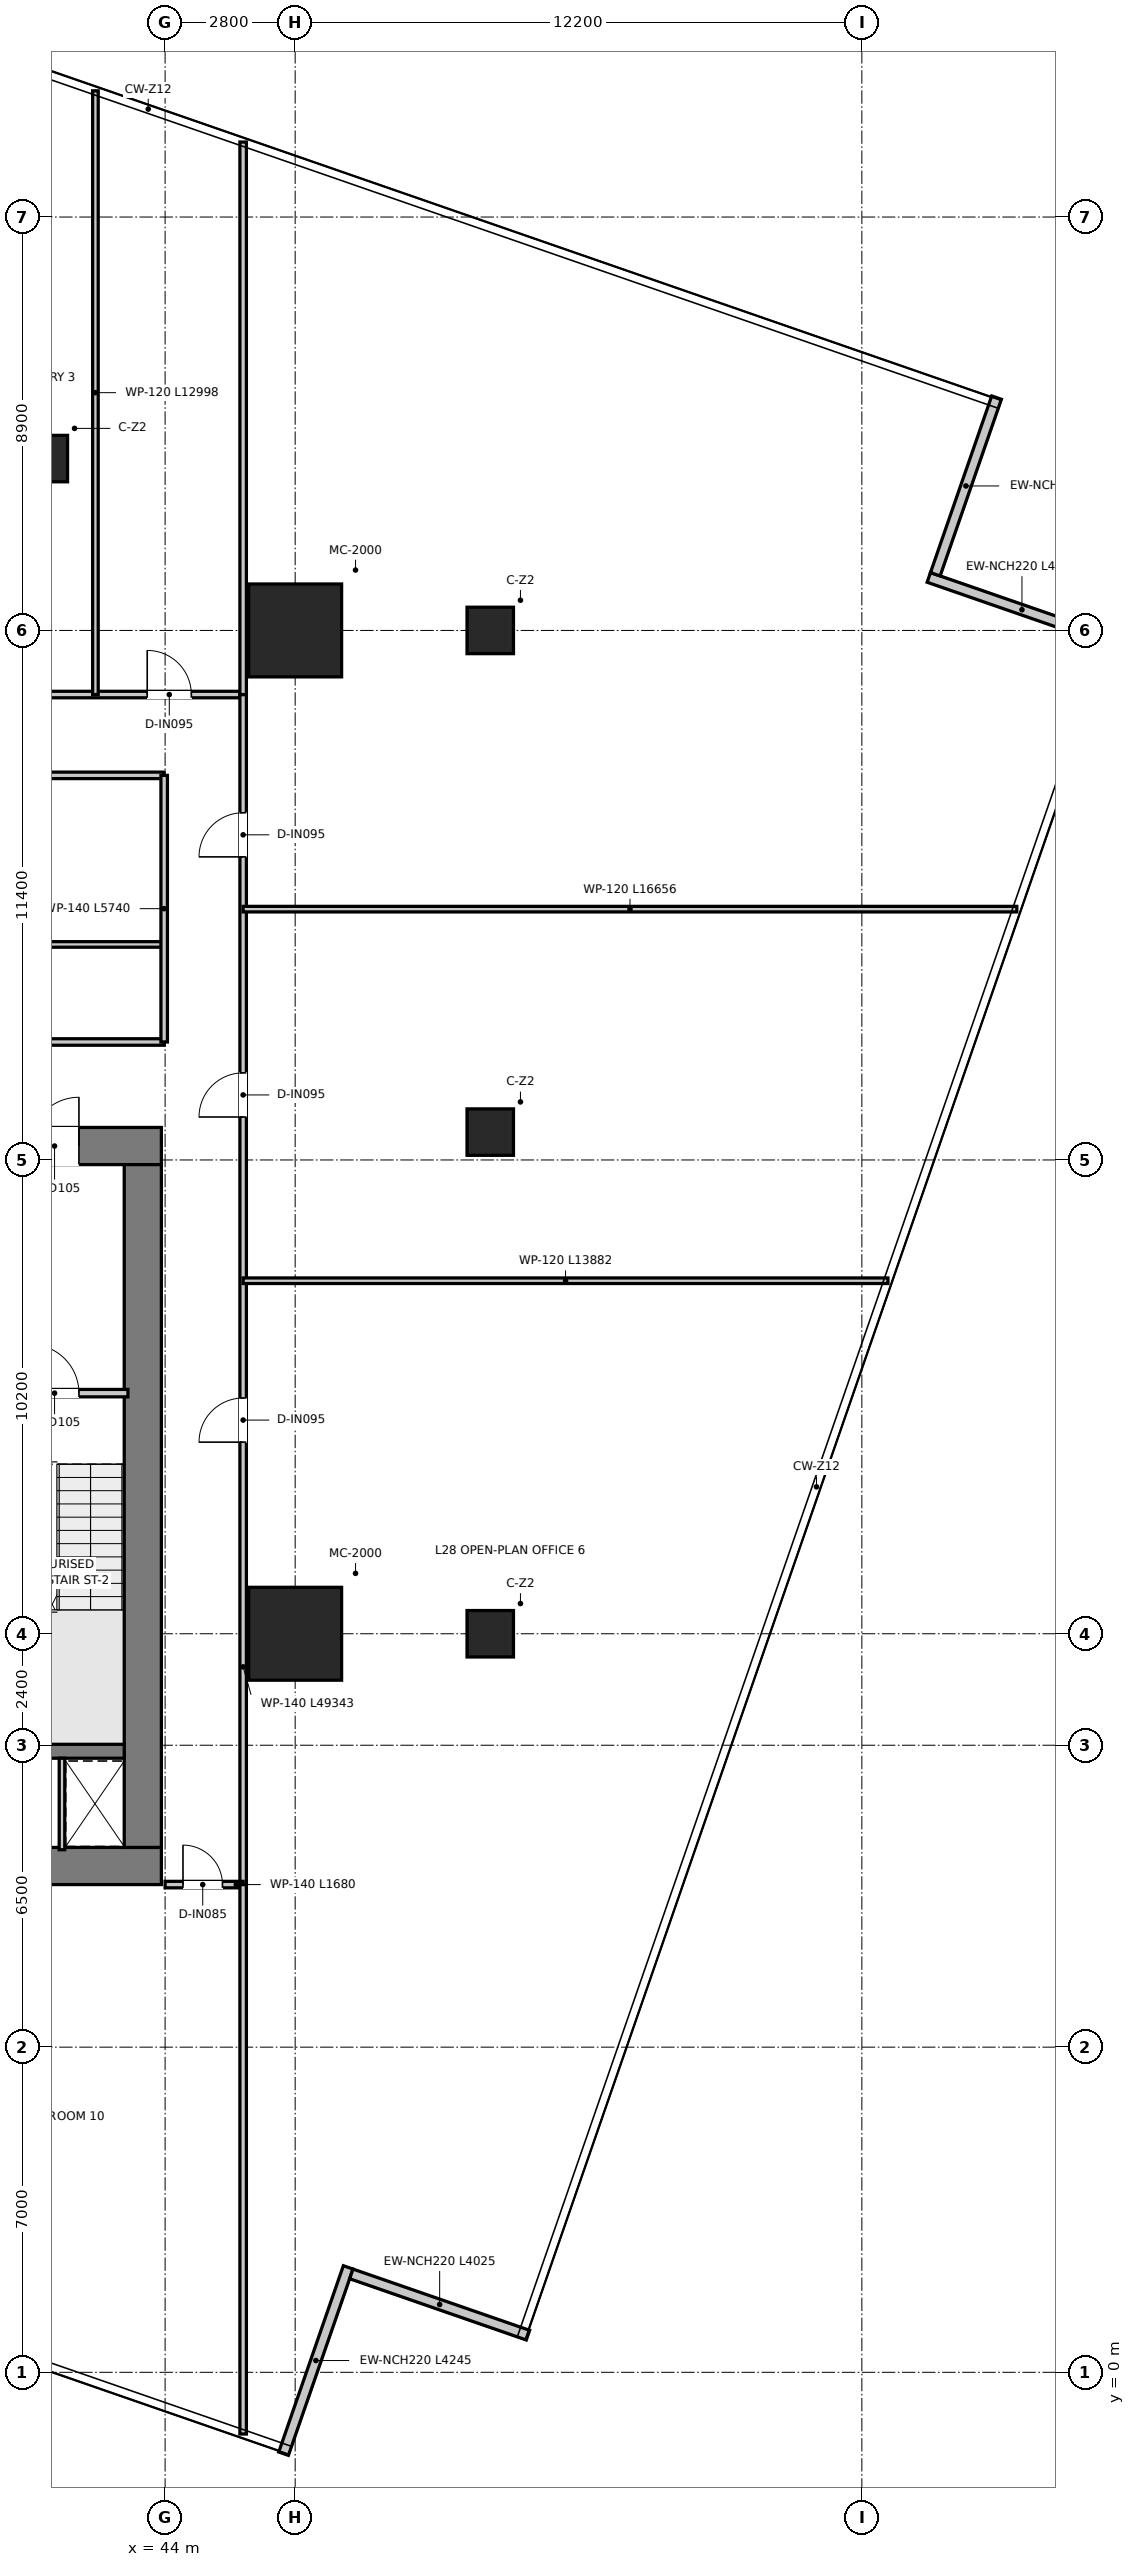
"""IFC4 building model, lengths in metres.
Left out: names, types, materials, properties, quantities, classifications, styles, units other than length and angle.
Written with IfcOpenShell. Run it as: python <this file> out.ifc"""

import sys

from ifc_helpers import new_model, si_unit, direction, frame, frame_2d, origin, origin_2d, place, context, subcontext, project, spatial, rectangle, extrude, source, transform, mapped, element, fill, save


model = new_model("IFC4")
c1 = context("Model", 3, precision=1e-05, world=origin(), true_north=direction((0.0, 1.0)))
c2 = subcontext(c1, "Body", "Model", "MODEL_VIEW")
j1 = project(units=[si_unit("LENGTHUNIT", "METRE"), si_unit("PLANEANGLEUNIT", "RADIAN")], contexts=[c1])
p1 = place(None, origin())
s1 = spatial("IfcSite", under=j1, at=p1, CompositionType="ELEMENT")
p2 = place(p1, origin())
s2 = spatial("IfcBuilding", under=s1, at=p2, CompositionType="ELEMENT")
p3 = place(p2, frame((0.0, 0.0, 117.7)))
s3 = spatial("IfcBuildingStorey", under=s2, at=p3, CompositionType="ELEMENT", Elevation=117.7)
p4 = place(p3, frame((28.08, 10.9, 0.0), z_axis=(0.0, 0.0, 1.0), x_axis=(1.0, 0.0, 0.0)))
e1 = element("IfcWall", 1, at=p4, inside=s3, PredefinedType="SHEAR", context=c2, shape_type="SweptSolid", body=[
    extrude(rectangle(XDim=15.84, YDim=0.8, at=frame_2d((7.92, 0.0))), origin(), (0.0, 0.0, 1.0), 3.95),
])
p5 = place(p3, frame((28.08, 26.4, 0.0), z_axis=(0.0, 0.0, 1.0), x_axis=(1.0, 0.0, 0.0)))
e2 = element("IfcWall", 2, at=p5, inside=s3, PredefinedType="SHEAR", context=c2, shape_type="SweptSolid", body=[
    extrude(rectangle(XDim=15.84, YDim=0.8, at=frame_2d((7.92, 0.0))), origin(), (0.0, 0.0, 1.0), 3.95),
])
p6 = place(p5, frame((7.22, 0.0, 0.0)))
e3 = element("IfcOpeningElement", 3, at=p6, cuts=e2, PredefinedType="OPENING", context=c2, shape_type="SweptSolid", body=[
    extrude(rectangle(XDim=1.4, YDim=2.2, at=frame_2d((0.7, 1.1))), frame((0.0, 0.41, 0.0), z_axis=(0.0, -1.0, 0.0), x_axis=(1.0, 0.0, 0.0)), (0.0, 0.0, 1.0), 0.82),
])
p7 = place(p5, frame((1.775, 0.0, 0.0)))
e4 = element("IfcOpeningElement", 4, at=p7, cuts=e2, PredefinedType="OPENING", context=c2, shape_type="SweptSolid", body=[
    extrude(rectangle(XDim=1.05, YDim=2.1, at=frame_2d((0.525, 1.05))), frame((0.0, 0.41, 0.0), z_axis=(0.0, -1.0, 0.0), x_axis=(1.0, 0.0, 0.0)), (0.0, 0.0, 1.0), 0.82),
])
p8 = place(p5, frame((13.015, 0.0, 0.0)))
e5 = element("IfcOpeningElement", 5, at=p8, cuts=e2, PredefinedType="OPENING", context=c2, shape_type="SweptSolid", body=[
    extrude(rectangle(XDim=1.05, YDim=2.1, at=frame_2d((0.525, 1.05))), frame((0.0, 0.41, 0.0), z_axis=(0.0, -1.0, 0.0), x_axis=(1.0, 0.0, 0.0)), (0.0, 0.0, 1.0), 0.82),
])
p9 = place(p3, frame((43.52, 11.3, 0.0), z_axis=(0.0, 0.0, 1.0), x_axis=(0.0, 1.0, 0.0)))
e6 = element("IfcWall", 6, at=p9, inside=s3, PredefinedType="SHEAR", context=c2, shape_type="SweptSolid", body=[
    extrude(rectangle(XDim=14.7, YDim=0.8, at=frame_2d((7.35, 0.0))), origin(), (0.0, 0.0, 1.0), 3.95),
])
p10 = place(p3, frame((40.02, 13.37, 0.0), z_axis=(0.0, 0.0, 1.0), x_axis=(1.0, 0.0, 0.0)))
e7 = element("IfcWall", 7, at=p10, inside=s3, PredefinedType="SHEAR", context=c2, shape_type="SweptSolid", body=[
    extrude(rectangle(XDim=3.1, YDim=0.3, at=frame_2d((1.55, 0.0))), origin(), (0.0, 0.0, 1.0), 3.95),
])
m1 = source(origin(), c2, "Body", "SweptSolid", [
    extrude(rectangle(XDim=2.0, YDim=2.0, at=origin_2d()), origin(), (0.0, 0.0, 1.0), 3.95),
])
for number, where, z_axis, x_axis in (
    (8, (46.8, 15.9, 0.0), (0.0, 0.0, 1.0), (1.0, 0.0, 0.0)),
    (9, (46.8, 37.5, 0.0), (0.0, 0.0, 1.0), (1.0, 0.0, 0.0)),
):
    element("IfcColumn", number, at=place(p3, frame(where, z_axis=z_axis, x_axis=x_axis)), inside=s3, PredefinedType="USERDEFINED", context=c2, shape_type="MappedRepresentation", body=[
        mapped(m1, transform((0.0, 0.0, 0.0), x_axis=(1.0, 0.0, 0.0), y_axis=(0.0, 1.0, 0.0), z_axis=(0.0, 0.0, 1.0), scale=1.0)),
    ])
m2 = source(origin(), c2, "Body", "SweptSolid", [
    extrude(rectangle(XDim=1.0, YDim=1.0, at=origin_2d()), origin(), (0.0, 0.0, 1.0), 3.95),
])
for number, where, z_axis, x_axis in (
    (10, (41.4, 41.2, 0.0), (0.0, 0.0, 1.0), (1.0, 0.0, 0.0)),
    (11, (51.0, 37.5, 0.0), (0.0, 0.0, 1.0), (1.0, 0.0, 0.0)),
    (12, (51.0, 26.7, 0.0), (0.0, 0.0, 1.0), (1.0, 0.0, 0.0)),
    (13, (51.0, 15.9, 0.0), (0.0, 0.0, 1.0), (1.0, 0.0, 0.0)),
):
    element("IfcColumn", number, at=place(p3, frame(where, z_axis=z_axis, x_axis=x_axis)), inside=s3, PredefinedType="COLUMN", context=c2, shape_type="MappedRepresentation", body=[
        mapped(m2, transform((0.0, 0.0, 0.0), x_axis=(1.0, 0.0, 0.0), y_axis=(0.0, 1.0, 0.0), z_axis=(0.0, 0.0, 1.0), scale=1.0)),
    ])
p11 = place(p3, frame((46.551, -1.752, 0.0), z_axis=(0.0, 0.0, 1.0), x_axis=(0.327661647146, 0.944795133873, 0.0)))
e14 = element("IfcWall", 14, at=p11, inside=s3, PredefinedType="ELEMENTEDWALL", context=c2, shape_type="SweptSolid", body=[
    extrude(rectangle(XDim=4.245, YDim=0.22, at=frame_2d((2.123, 0.0))), origin(), (0.0, 0.0, 1.0), 3.67),
])
p12 = place(p3, frame((48.009, 2.119, 0.0), z_axis=(0.0, 0.0, 1.0), x_axis=(0.944811416539, -0.327614693164, 0.0)))
e15 = element("IfcWall", 15, at=p12, inside=s3, PredefinedType="ELEMENTEDWALL", context=c2, shape_type="SweptSolid", body=[
    extrude(rectangle(XDim=4.025, YDim=0.22, at=frame_2d((2.012, 0.0))), origin(), (0.0, 0.0, 1.0), 3.67),
])
p13 = place(p3, frame((64.452, 37.25, 0.0), z_axis=(0.0, 0.0, 1.0), x_axis=(-0.944801308279, 0.327643843028, 0.0)))
e16 = element("IfcWall", 16, at=p13, inside=s3, PredefinedType="ELEMENTEDWALL", context=c2, shape_type="SweptSolid", body=[
    extrude(rectangle(XDim=4.245, YDim=0.22, at=frame_2d((2.123, 0.0))), origin(), (0.0, 0.0, 1.0), 3.67),
])
p14 = place(p3, frame((60.581, 38.709, 0.0), z_axis=(0.0, 0.0, 1.0), x_axis=(0.327650062068, 0.94479915158, 0.0)))
e17 = element("IfcWall", 17, at=p14, inside=s3, PredefinedType="ELEMENTEDWALL", context=c2, shape_type="SweptSolid", body=[
    extrude(rectangle(XDim=4.025, YDim=0.22, at=frame_2d((2.013, 0.0))), origin(), (0.0, 0.0, 1.0), 3.67),
])
p15 = place(p3, frame((40.04, 21.08, 0.0), z_axis=(0.0, 0.0, 1.0), x_axis=(1.0, 0.0, 0.0)))
e18 = element("IfcWall", 18, at=p15, inside=s3, PredefinedType="PARTITIONING", context=c2, shape_type="SweptSolid", body=[
    extrude(rectangle(XDim=3.16, YDim=0.16, at=frame_2d((1.58, 0.0))), origin(), (0.0, 0.0, 1.0), 3.67),
])
p16 = place(p15, frame((1.055, 0.0, 0.0)))
e19 = element("IfcOpeningElement", 19, at=p16, cuts=e18, PredefinedType="OPENING", context=c2, shape_type="SweptSolid", body=[
    extrude(rectangle(XDim=1.05, YDim=2.1, at=frame_2d((0.525, 1.05))), frame((0.0, 0.09, 0.0), z_axis=(0.0, -1.0, 0.0), x_axis=(1.0, 0.0, 0.0)), (0.0, 0.0, 1.0), 0.18),
])
p17 = place(p3, frame((41.78, 11.25, 0.0), z_axis=(0.0, 0.0, 1.0), x_axis=(0.0, 1.0, 0.0)))
e20 = element("IfcWall", 20, at=p17, inside=s3, PredefinedType="PARTITIONING", context=c2, shape_type="SweptSolid", body=[
    extrude(rectangle(XDim=1.97, YDim=0.12, at=frame_2d((0.985, 0.0))), origin(), (0.0, 0.0, 1.0), 3.67),
])
p18 = place(p3, frame((28.02, 28.64, 0.0), z_axis=(0.0, 0.0, 1.0), x_axis=(1.0, 0.0, 0.0)))
e21 = element("IfcWall", 21, at=p18, inside=s3, PredefinedType="PARTITIONING", context=c2, shape_type="SweptSolid", body=[
    extrude(rectangle(XDim=15.96, YDim=0.14, at=frame_2d((7.98, 0.0))), origin(), (0.0, 0.0, 1.0), 3.08),
])
p19 = place(p18, frame((7.455, 0.0, 0.0)))
e22 = element("IfcOpeningElement", 22, at=p19, cuts=e21, PredefinedType="OPENING", context=c2, shape_type="SweptSolid", body=[
    extrude(rectangle(XDim=1.05, YDim=2.15, at=frame_2d((0.525, 1.075))), frame((0.0, 0.08, 0.0), z_axis=(0.0, -1.0, 0.0), x_axis=(1.0, 0.0, 0.0)), (0.0, 0.0, 1.0), 0.16),
])
p20 = place(p3, frame((28.02, 30.74, 0.0), z_axis=(0.0, 0.0, 1.0), x_axis=(1.0, 0.0, 0.0)))
e23 = element("IfcWall", 23, at=p20, inside=s3, PredefinedType="PARTITIONING", context=c2, shape_type="SweptSolid", body=[
    extrude(rectangle(XDim=15.96, YDim=0.12, at=frame_2d((7.98, 0.0))), origin(), (0.0, 0.0, 1.0), 3.08),
])
p21 = place(p3, frame((28.02, 34.38, 0.0), z_axis=(0.0, 0.0, 1.0), x_axis=(1.0, 0.0, 0.0)))
e24 = element("IfcWall", 24, at=p21, inside=s3, PredefinedType="PARTITIONING", context=c2, shape_type="SweptSolid", body=[
    extrude(rectangle(XDim=15.96, YDim=0.14, at=frame_2d((7.98, 0.0))), origin(), (0.0, 0.0, 1.0), 3.08),
])
p22 = place(p21, frame((1.13, 0.0, 0.0)))
e25 = element("IfcOpeningElement", 25, at=p22, cuts=e24, PredefinedType="OPENING", context=c2, shape_type="SweptSolid", body=[
    extrude(rectangle(XDim=0.9, YDim=2.1, at=frame_2d((0.45, 1.05))), frame((0.0, 0.08, 0.0), z_axis=(0.0, -1.0, 0.0), x_axis=(1.0, 0.0, 0.0)), (0.0, 0.0, 1.0), 0.16),
])
p23 = place(p21, frame((4.33, 0.0, 0.0)))
e26 = element("IfcOpeningElement", 26, at=p23, cuts=e24, PredefinedType="OPENING", context=c2, shape_type="SweptSolid", body=[
    extrude(rectangle(XDim=0.9, YDim=2.1, at=frame_2d((0.45, 1.05))), frame((0.0, 0.08, 0.0), z_axis=(0.0, -1.0, 0.0), x_axis=(1.0, 0.0, 0.0)), (0.0, 0.0, 1.0), 0.16),
])
p24 = place(p21, frame((7.355, 0.0, 0.0)))
e27 = element("IfcOpeningElement", 27, at=p24, cuts=e24, PredefinedType="OPENING", context=c2, shape_type="SweptSolid", body=[
    extrude(rectangle(XDim=0.95, YDim=2.1, at=frame_2d((0.475, 1.05))), frame((0.0, 0.08, 0.0), z_axis=(0.0, -1.0, 0.0), x_axis=(1.0, 0.0, 0.0)), (0.0, 0.0, 1.0), 0.16),
])
p25 = place(p21, frame((12.23, 0.0, 0.0)))
e28 = element("IfcOpeningElement", 28, at=p25, cuts=e24, PredefinedType="OPENING", context=c2, shape_type="SweptSolid", body=[
    extrude(rectangle(XDim=0.95, YDim=2.1, at=frame_2d((0.475, 1.05))), frame((0.0, 0.08, 0.0), z_axis=(0.0, -1.0, 0.0), x_axis=(1.0, 0.0, 0.0)), (0.0, 0.0, 1.0), 0.16),
])
p26 = place(p3, frame((43.98, 28.64, 0.0), z_axis=(0.0, 0.0, 1.0), x_axis=(0.0, 1.0, 0.0)))
e29 = element("IfcWall", 29, at=p26, inside=s3, PredefinedType="PARTITIONING", context=c2, shape_type="SweptSolid", body=[
    extrude(rectangle(XDim=5.74, YDim=0.14, at=frame_2d((2.87, 0.0))), origin(), (0.0, 0.0, 1.0), 3.27),
])
p27 = place(p3, frame((26.32, 36.12, 0.0), z_axis=(0.0, 0.0, 1.0), x_axis=(1.0, 0.0, 0.0)))
e30 = element("IfcWall", 30, at=p27, inside=s3, PredefinedType="PARTITIONING", context=c2, shape_type="SweptSolid", body=[
    extrude(rectangle(XDim=19.36, YDim=0.14, at=frame_2d((9.68, 0.0))), origin(), (0.0, 0.0, 1.0), 3.08),
])
p28 = place(p27, frame((1.615, 0.0, 0.0)))
e31 = element("IfcOpeningElement", 31, at=p28, cuts=e30, PredefinedType="OPENING", context=c2, shape_type="SweptSolid", body=[
    extrude(rectangle(XDim=0.95, YDim=2.1, at=frame_2d((0.475, 1.05))), frame((0.0, 0.08, 0.0), z_axis=(0.0, -1.0, 0.0), x_axis=(1.0, 0.0, 0.0)), (0.0, 0.0, 1.0), 0.16),
])
p29 = place(p27, frame((6.705, 0.0, 0.0)))
e32 = element("IfcOpeningElement", 32, at=p29, cuts=e30, PredefinedType="OPENING", context=c2, shape_type="SweptSolid", body=[
    extrude(rectangle(XDim=0.95, YDim=2.1, at=frame_2d((0.475, 1.05))), frame((0.0, 0.08, 0.0), z_axis=(0.0, -1.0, 0.0), x_axis=(1.0, 0.0, 0.0)), (0.0, 0.0, 1.0), 0.16),
])
p30 = place(p27, frame((12.705, 0.0, 0.0)))
e33 = element("IfcOpeningElement", 33, at=p30, cuts=e30, PredefinedType="OPENING", context=c2, shape_type="SweptSolid", body=[
    extrude(rectangle(XDim=0.95, YDim=2.1, at=frame_2d((0.475, 1.05))), frame((0.0, 0.08, 0.0), z_axis=(0.0, -1.0, 0.0), x_axis=(1.0, 0.0, 0.0)), (0.0, 0.0, 1.0), 0.16),
])
p31 = place(p27, frame((17.295, 0.0, 0.0)))
e34 = element("IfcOpeningElement", 34, at=p31, cuts=e30, PredefinedType="OPENING", context=c2, shape_type="SweptSolid", body=[
    extrude(rectangle(XDim=0.95, YDim=2.1, at=frame_2d((0.475, 1.05))), frame((0.0, 0.08, 0.0), z_axis=(0.0, -1.0, 0.0), x_axis=(1.0, 0.0, 0.0)), (0.0, 0.0, 1.0), 0.16),
])
p32 = place(p3, frame((45.68, 10.5, 0.0), z_axis=(0.0, 0.0, 1.0), x_axis=(0.0, 1.0, 0.0)))
e35 = element("IfcWall", 35, at=p32, inside=s3, PredefinedType="PARTITIONING", context=c2, shape_type="SweptSolid", body=[
    extrude(rectangle(XDim=25.62, YDim=0.14, at=frame_2d((12.81, 0.0))), origin(), (0.0, 0.0, 1.0), 2.97),
])
p33 = place(p32, frame((9.525, 0.0, 0.0)))
e36 = element("IfcOpeningElement", 36, at=p33, cuts=e35, PredefinedType="OPENING", context=c2, shape_type="SweptSolid", body=[
    extrude(rectangle(XDim=0.95, YDim=2.1, at=frame_2d((0.475, 1.05))), frame((0.0, 0.08, 0.0), z_axis=(0.0, -1.0, 0.0), x_axis=(1.0, 0.0, 0.0)), (0.0, 0.0, 1.0), 0.16),
])
p34 = place(p32, frame((16.525, 0.0, 0.0)))
e37 = element("IfcOpeningElement", 37, at=p34, cuts=e35, PredefinedType="OPENING", context=c2, shape_type="SweptSolid", body=[
    extrude(rectangle(XDim=0.95, YDim=2.1, at=frame_2d((0.475, 1.05))), frame((0.0, 0.08, 0.0), z_axis=(0.0, -1.0, 0.0), x_axis=(1.0, 0.0, 0.0)), (0.0, 0.0, 1.0), 0.16),
])
p35 = place(p32, frame((22.125, 0.0, 0.0)))
e38 = element("IfcOpeningElement", 38, at=p35, cuts=e35, PredefinedType="OPENING", context=c2, shape_type="SweptSolid", body=[
    extrude(rectangle(XDim=0.95, YDim=2.1, at=frame_2d((0.475, 1.05))), frame((0.0, 0.08, 0.0), z_axis=(0.0, -1.0, 0.0), x_axis=(1.0, 0.0, 0.0)), (0.0, 0.0, 1.0), 0.16),
])
p36 = place(p3, frame((44.0, 10.5, 0.0), z_axis=(0.0, 0.0, 1.0), x_axis=(1.0, 0.0, 0.0)))
e39 = element("IfcWall", 39, at=p36, inside=s3, PredefinedType="PARTITIONING", context=c2, shape_type="SweptSolid", body=[
    extrude(rectangle(XDim=1.68, YDim=0.14, at=frame_2d((0.84, 0.0))), origin(), (0.0, 0.0, 1.0), 3.67),
])
p37 = place(p36, frame((0.385, 0.0, 0.0)))
e40 = element("IfcOpeningElement", 40, at=p37, cuts=e39, PredefinedType="OPENING", context=c2, shape_type="SweptSolid", body=[
    extrude(rectangle(XDim=0.85, YDim=2.1, at=frame_2d((0.425, 1.05))), frame((0.0, 0.08, 0.0), z_axis=(0.0, -1.0, 0.0), x_axis=(1.0, 0.0, 0.0)), (0.0, 0.0, 1.0), 0.16),
])
p38 = place(p3, frame((45.68, 36.12, 0.0), z_axis=(0.0, 0.0, 1.0), x_axis=(0.0, 1.0, 0.0)))
e41 = element("IfcWall", 41, at=p38, inside=s3, PredefinedType="PARTITIONING", context=c2, shape_type="SweptSolid", body=[
    extrude(rectangle(XDim=11.895, YDim=0.14, at=frame_2d((5.947, 0.0))), origin(), (0.0, 0.0, 1.0), 2.97),
])
p39 = place(p3, frame((45.68, -1.329, 0.0), z_axis=(0.0, 0.0, 1.0), x_axis=(0.0, 1.0, 0.0)))
e42 = element("IfcWall", 42, at=p39, inside=s3, PredefinedType="PARTITIONING", context=c2, shape_type="SweptSolid", body=[
    extrude(rectangle(XDim=11.829, YDim=0.14, at=frame_2d((5.914, 0.0))), origin(), (0.0, 0.0, 1.0), 3.67),
])
p40 = place(p3, frame((42.5, 36.12, 0.0), z_axis=(0.0, 0.0, 1.0), x_axis=(0.0, 1.0, 0.0)))
e43 = element("IfcWall", 43, at=p40, inside=s3, PredefinedType="PARTITIONING", context=c2, shape_type="SweptSolid", body=[
    extrude(rectangle(XDim=12.998, YDim=0.12, at=frame_2d((6.499, 0.0))), origin(), (0.0, 0.0, 1.0), 2.97),
])
p41 = place(p3, frame((45.68, 23.5, 0.0), z_axis=(0.0, 0.0, 1.0), x_axis=(1.0, 0.0, 0.0)))
e44 = element("IfcWall", 44, at=p41, inside=s3, PredefinedType="PARTITIONING", context=c2, shape_type="SweptSolid", body=[
    extrude(rectangle(XDim=13.882, YDim=0.12, at=frame_2d((6.941, 0.0))), origin(), (0.0, 0.0, 1.0), 2.97),
])
p42 = place(p3, frame((45.68, 31.5, 0.0), z_axis=(0.0, 0.0, 1.0), x_axis=(1.0, 0.0, 0.0)))
e45 = element("IfcWall", 45, at=p42, inside=s3, PredefinedType="PARTITIONING", context=c2, shape_type="SweptSolid", body=[
    extrude(rectangle(XDim=16.656, YDim=0.12, at=frame_2d((8.328, 0.0))), origin(), (0.0, 0.0, 1.0), 2.97),
])
p43 = place(p16, origin())
e46 = element("IfcDoor", 46, at=p43, inside=s3, OperationType="SINGLE_SWING_LEFT", PredefinedType="DOOR", context=c2, shape_type="SweptSolid", body=[
    extrude(rectangle(XDim=1.05, YDim=2.1, at=frame_2d((0.525, 1.05))), frame((0.0, 0.025, 0.0), z_axis=(0.0, -1.0, 0.0), x_axis=(1.0, 0.0, 0.0)), (0.0, 0.0, 1.0), 0.05),
])
fill(e19, e46)
p44 = place(p8, origin())
e47 = element("IfcDoor", 47, at=p44, inside=s3, OperationType="SINGLE_SWING_RIGHT", PredefinedType="DOOR", context=c2, shape_type="SweptSolid", body=[
    extrude(rectangle(XDim=1.05, YDim=2.1, at=frame_2d((0.525, 1.05))), frame((0.0, 0.025, 0.0), z_axis=(0.0, -1.0, 0.0), x_axis=(1.0, 0.0, 0.0)), (0.0, 0.0, 1.0), 0.05),
])
fill(e5, e47)
p45 = place(p31, origin())
e48 = element("IfcDoor", 48, at=p45, inside=s3, OperationType="SINGLE_SWING_LEFT", PredefinedType="DOOR", context=c2, shape_type="SweptSolid", body=[
    extrude(rectangle(XDim=0.95, YDim=2.1, at=frame_2d((0.475, 1.05))), frame((0.0, 0.025, 0.0), z_axis=(0.0, -1.0, 0.0), x_axis=(1.0, 0.0, 0.0)), (0.0, 0.0, 1.0), 0.05),
])
fill(e34, e48)
p46 = place(p33, origin())
e49 = element("IfcDoor", 49, at=p46, inside=s3, OperationType="SINGLE_SWING_LEFT", PredefinedType="DOOR", context=c2, shape_type="SweptSolid", body=[
    extrude(rectangle(XDim=0.95, YDim=2.1, at=frame_2d((0.475, 1.05))), frame((0.0, 0.025, 0.0), z_axis=(0.0, -1.0, 0.0), x_axis=(1.0, 0.0, 0.0)), (0.0, 0.0, 1.0), 0.05),
])
fill(e36, e49)
p47 = place(p34, origin())
e50 = element("IfcDoor", 50, at=p47, inside=s3, OperationType="SINGLE_SWING_LEFT", PredefinedType="DOOR", context=c2, shape_type="SweptSolid", body=[
    extrude(rectangle(XDim=0.95, YDim=2.1, at=frame_2d((0.475, 1.05))), frame((0.0, 0.025, 0.0), z_axis=(0.0, -1.0, 0.0), x_axis=(1.0, 0.0, 0.0)), (0.0, 0.0, 1.0), 0.05),
])
fill(e37, e50)
p48 = place(p35, origin())
e51 = element("IfcDoor", 51, at=p48, inside=s3, OperationType="SINGLE_SWING_LEFT", PredefinedType="DOOR", context=c2, shape_type="SweptSolid", body=[
    extrude(rectangle(XDim=0.95, YDim=2.1, at=frame_2d((0.475, 1.05))), frame((0.0, 0.025, 0.0), z_axis=(0.0, -1.0, 0.0), x_axis=(1.0, 0.0, 0.0)), (0.0, 0.0, 1.0), 0.05),
])
fill(e38, e51)
p49 = place(p37, origin())
e52 = element("IfcDoor", 52, at=p49, inside=s3, OperationType="SINGLE_SWING_LEFT", PredefinedType="DOOR", context=c2, shape_type="SweptSolid", body=[
    extrude(rectangle(XDim=0.85, YDim=2.1, at=frame_2d((0.425, 1.05))), frame((0.0, 0.025, 0.0), z_axis=(0.0, -1.0, 0.0), x_axis=(1.0, 0.0, 0.0)), (0.0, 0.0, 1.0), 0.05),
])
fill(e40, e52)
save(model, sys.argv[1])
